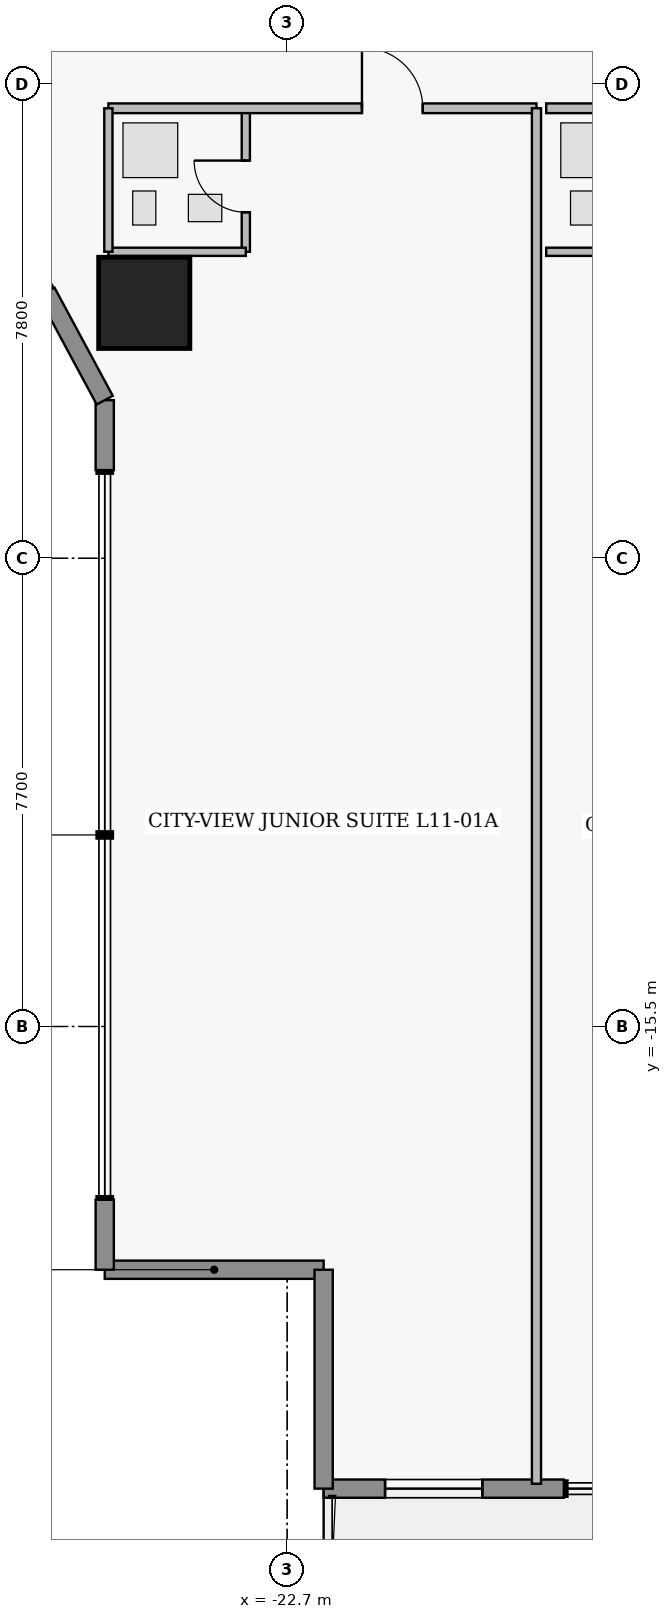
"""IFC4 building model, lengths in metres.
Left out: names, types, materials, properties, quantities, classifications, styles, units other than length and angle.
Written with IfcOpenShell. Run it as: python <this file> out.ifc"""

import sys

from ifc_helpers import new_model, si_unit, direction, frame, frame_2d, origin, origin_2d, place, context, subcontext, project, spatial, rectangle, extrude, element, fill, save


model = new_model("IFC4")
c1 = context("Model", 3, precision=1e-05, world=origin(), true_north=direction((0.0, 1.0)))
c2 = subcontext(c1, "Body", "Model", "MODEL_VIEW")
j1 = project(units=[si_unit("LENGTHUNIT", "METRE"), si_unit("PLANEANGLEUNIT", "RADIAN")], contexts=[c1])
p1 = place(None, origin())
s1 = spatial("IfcSite", under=j1, at=p1, CompositionType="ELEMENT")
p2 = place(p1, origin())
s2 = spatial("IfcBuilding", under=s1, at=p2, CompositionType="ELEMENT")
p3 = place(p2, frame((0.0, 0.0, 49.5)))
s3 = spatial("IfcBuildingStorey", under=s2, at=p3, CompositionType="ELEMENT", Elevation=49.5)
p4 = place(p3, frame((-25.05, -3.6, 0.0), z_axis=(0.0, 0.0, 1.0), x_axis=(1.0, 0.0, 0.0)))
e1 = element("IfcColumn", 1, at=p4, inside=s3, PredefinedType="COLUMN", context=c2, shape_type="SweptSolid", body=[
    extrude(rectangle(XDim=1.5, YDim=1.5, at=origin_2d()), origin(), (0.0, 0.0, 1.0), 3.65),
])
p5 = place(p3, frame((-22.1, -19.5, 0.0), z_axis=(0.0, 0.0, 1.0), x_axis=(-1.0, 0.0, 0.0)))
e2 = element("IfcWall", 2, at=p5, inside=s3, PredefinedType="STANDARD", context=c2, shape_type="SweptSolid", body=[
    extrude(rectangle(XDim=3.6, YDim=0.3, at=frame_2d((1.8, 0.0))), origin(), (0.0, 0.0, 1.0), 3.43),
])
p6 = place(p3, frame((-25.7, -19.5, 0.0), z_axis=(0.0, 0.0, 1.0), x_axis=(0.0, 1.0, 0.0)))
e3 = element("IfcWall", 3, at=p6, inside=s3, PredefinedType="STANDARD", context=c2, shape_type="SweptSolid", body=[
    extrude(rectangle(XDim=1.15, YDim=0.3, at=frame_2d((0.575, 0.0))), origin(), (0.0, 0.0, 1.0), 3.43),
])
p7 = place(p3, frame((-25.7, -6.35, 0.0), z_axis=(0.0, 0.0, 1.0), x_axis=(0.0, 1.0, 0.0)))
e4 = element("IfcWall", 4, at=p7, inside=s3, PredefinedType="STANDARD", context=c2, shape_type="SweptSolid", body=[
    extrude(rectangle(XDim=1.15, YDim=0.3, at=frame_2d((0.575, 0.0))), origin(), (0.0, 0.0, 1.0), 3.43),
])
p8 = place(p3, frame((-25.7, -5.2, 0.0), z_axis=(0.0, 0.0, 1.0), x_axis=(-0.474121438562, 0.88045946045, 0.0)))
e5 = element("IfcWall", 5, at=p8, inside=s3, PredefinedType="STANDARD", context=c2, shape_type="SweptSolid", body=[
    extrude(rectangle(XDim=2.021, YDim=0.3, at=frame_2d((1.01, 0.0))), origin(), (0.0, 0.0, 1.0), 3.43),
])
p9 = place(p3, frame((-28.5, 0.0, 0.0), z_axis=(0.0, 0.0, 1.0), x_axis=(0.474109683532, 0.880465790352, 0.0)))
e6 = element("IfcWall", 6, at=p9, inside=s3, PredefinedType="STANDARD", context=c2, shape_type="SweptSolid", body=[
    extrude(rectangle(XDim=5.906, YDim=0.3, at=frame_2d((2.953, 0.0))), origin(), (0.0, 0.0, 1.0), 3.43),
])
p10 = place(p9, frame((2.432, 0.0, 0.95)))
e7 = element("IfcOpeningElement", 7, at=p10, cuts=e6, PredefinedType="OPENING", context=c2, shape_type="SweptSolid", body=[
    extrude(rectangle(XDim=1.15, YDim=1.55, at=frame_2d((0.575, 0.775))), frame((0.0, 0.16, 0.0), z_axis=(0.0, -1.0, 0.0), x_axis=(1.0, 0.0, 0.0)), (0.0, 0.0, 1.0), 0.32),
])
p11 = place(p3, frame((-18.15, -23.1, 0.0), z_axis=(0.0, 0.0, 1.0), x_axis=(-1.0, 0.0, 0.0)))
e8 = element("IfcWall", 8, at=p11, inside=s3, PredefinedType="STANDARD", context=c2, shape_type="SweptSolid", body=[
    extrude(rectangle(XDim=3.95, YDim=0.3, at=frame_2d((1.975, 0.0))), origin(), (0.0, 0.0, 1.0), 3.43),
])
p12 = place(p11, frame((1.34, 0.0, 0.85)))
e9 = element("IfcOpeningElement", 9, at=p12, cuts=e8, PredefinedType="OPENING", context=c2, shape_type="SweptSolid", body=[
    extrude(rectangle(XDim=1.6, YDim=1.8, at=frame_2d((0.8, 0.9))), frame((0.0, 0.16, 0.0), z_axis=(0.0, -1.0, 0.0), x_axis=(1.0, 0.0, 0.0)), (0.0, 0.0, 1.0), 0.32),
])
p13 = place(p3, frame((-22.1, -23.1, 0.0), z_axis=(0.0, 0.0, 1.0), x_axis=(0.0, 1.0, 0.0)))
e10 = element("IfcWall", 10, at=p13, inside=s3, PredefinedType="STANDARD", context=c2, shape_type="SweptSolid", body=[
    extrude(rectangle(XDim=3.6, YDim=0.3, at=frame_2d((1.8, 0.0))), origin(), (0.0, 0.0, 1.0), 3.43),
])
p14 = place(p3, frame((-23.38, -2.76, 0.0), z_axis=(0.0, 0.0, 1.0), x_axis=(0.0, 1.0, 0.0)))
e11 = element("IfcWall", 11, at=p14, inside=s3, PredefinedType="PLUMBINGWALL", context=c2, shape_type="SweptSolid", body=[
    extrude(rectangle(XDim=2.36, YDim=0.135, at=frame_2d((1.18, 0.0))), origin(), (0.0, 0.0, 1.0), 3.43),
])
p15 = place(p14, frame((0.65, 0.0, 0.0)))
e12 = element("IfcOpeningElement", 12, at=p15, cuts=e11, PredefinedType="OPENING", context=c2, shape_type="SweptSolid", body=[
    extrude(rectangle(XDim=0.85, YDim=2.1, at=frame_2d((0.425, 1.05))), frame((0.0, 0.077, 0.0), z_axis=(0.0, -1.0, 0.0), x_axis=(1.0, 0.0, 0.0)), (0.0, 0.0, 1.0), 0.155),
])
p16 = place(p3, frame((-25.64, -0.4, 0.0), z_axis=(0.0, 0.0, 1.0), x_axis=(1.0, 0.0, 0.0)))
e13 = element("IfcWall", 13, at=p16, inside=s3, PredefinedType="PARTITIONING", context=c2, shape_type="SweptSolid", body=[
    extrude(rectangle(XDim=7.04, YDim=0.16, at=frame_2d((3.52, 0.0))), origin(), (0.0, 0.0, 1.0), 3.43),
])
p17 = place(p16, frame((4.17, 0.0, 0.0)))
e14 = element("IfcOpeningElement", 14, at=p17, cuts=e13, PredefinedType="OPENING", context=c2, shape_type="SweptSolid", body=[
    extrude(rectangle(XDim=1.0, YDim=2.15, at=frame_2d((0.5, 1.075))), frame((0.0, 0.09, 0.0), z_axis=(0.0, -1.0, 0.0), x_axis=(1.0, 0.0, 0.0)), (0.0, 0.0, 1.0), 0.18),
])
p18 = place(p3, frame((-18.44, -0.4, 0.0), z_axis=(0.0, 0.0, 1.0), x_axis=(1.0, 0.0, 0.0)))
e15 = element("IfcWall", 15, at=p18, inside=s3, PredefinedType="PARTITIONING", context=c2, shape_type="SweptSolid", body=[
    extrude(rectangle(XDim=7.04, YDim=0.16, at=frame_2d((3.52, 0.0))), origin(), (0.0, 0.0, 1.0), 3.43),
])
p19 = place(p18, frame((4.17, 0.0, 0.0)))
e16 = element("IfcOpeningElement", 16, at=p19, cuts=e15, PredefinedType="OPENING", context=c2, shape_type="SweptSolid", body=[
    extrude(rectangle(XDim=1.0, YDim=2.15, at=frame_2d((0.5, 1.075))), frame((0.0, 0.09, 0.0), z_axis=(0.0, -1.0, 0.0), x_axis=(1.0, 0.0, 0.0)), (0.0, 0.0, 1.0), 0.18),
])
p20 = place(p3, frame((-25.64, -2.76, 0.0), z_axis=(0.0, 0.0, 1.0), x_axis=(1.0, 0.0, 0.0)))
e17 = element("IfcWall", 17, at=p20, inside=s3, PredefinedType="PLUMBINGWALL", context=c2, shape_type="SweptSolid", body=[
    extrude(rectangle(XDim=2.26, YDim=0.135, at=frame_2d((1.13, 0.0))), origin(), (0.0, 0.0, 1.0), 3.43),
])
p21 = place(p3, frame((-25.64, -2.76, 0.0), z_axis=(0.0, 0.0, 1.0), x_axis=(0.0, 1.0, 0.0)))
e18 = element("IfcWall", 18, at=p21, inside=s3, PredefinedType="PLUMBINGWALL", context=c2, shape_type="SweptSolid", body=[
    extrude(rectangle(XDim=2.36, YDim=0.135, at=frame_2d((1.18, 0.0))), origin(), (0.0, 0.0, 1.0), 3.43),
])
p22 = place(p3, frame((-18.6, -23.02, 0.0), z_axis=(0.0, 0.0, 1.0), x_axis=(0.0, 1.0, 0.0)))
e19 = element("IfcWall", 19, at=p22, inside=s3, PredefinedType="PARTITIONING", context=c2, shape_type="SweptSolid", body=[
    extrude(rectangle(XDim=22.62, YDim=0.15, at=frame_2d((11.31, 0.0))), origin(), (0.0, 0.0, 1.0), 3.43),
])
p23 = place(p3, frame((-18.44, -2.76, 0.0), z_axis=(0.0, 0.0, 1.0), x_axis=(1.0, 0.0, 0.0)))
e20 = element("IfcWall", 20, at=p23, inside=s3, PredefinedType="PLUMBINGWALL", context=c2, shape_type="SweptSolid", body=[
    extrude(rectangle(XDim=2.26, YDim=0.135, at=frame_2d((1.13, 0.0))), origin(), (0.0, 0.0, 1.0), 3.43),
])
p24 = place(p12, origin())
e21 = element("IfcWindow", 21, at=p24, inside=s3, PartitioningType="SINGLE_PANEL", PredefinedType="WINDOW", context=c2, shape_type="SweptSolid", body=[
    extrude(rectangle(XDim=1.6, YDim=1.8, at=frame_2d((0.8, 0.9))), frame((0.0, 0.03, 0.0), z_axis=(0.0, -1.0, 0.0), x_axis=(1.0, 0.0, 0.0)), (0.0, 0.0, 1.0), 0.06),
])
fill(e9, e21)
p25 = place(p15, origin())
e22 = element("IfcDoor", 22, at=p25, inside=s3, OperationType="SINGLE_SWING_RIGHT", PredefinedType="DOOR", context=c2, shape_type="SweptSolid", body=[
    extrude(rectangle(XDim=0.85, YDim=2.1, at=frame_2d((0.425, 1.05))), frame((0.0, 0.025, 0.0), z_axis=(0.0, -1.0, 0.0), x_axis=(1.0, 0.0, 0.0)), (0.0, 0.0, 1.0), 0.05),
])
fill(e12, e22)
p26 = place(p17, origin())
e23 = element("IfcDoor", 23, at=p26, inside=s3, OperationType="SINGLE_SWING_LEFT", PredefinedType="DOOR", context=c2, shape_type="SweptSolid", body=[
    extrude(rectangle(XDim=1.0, YDim=2.15, at=frame_2d((0.5, 1.075))), frame((0.0, 0.025, 0.0), z_axis=(0.0, -1.0, 0.0), x_axis=(1.0, 0.0, 0.0)), (0.0, 0.0, 1.0), 0.05),
])
fill(e14, e23)
save(model, sys.argv[1])
